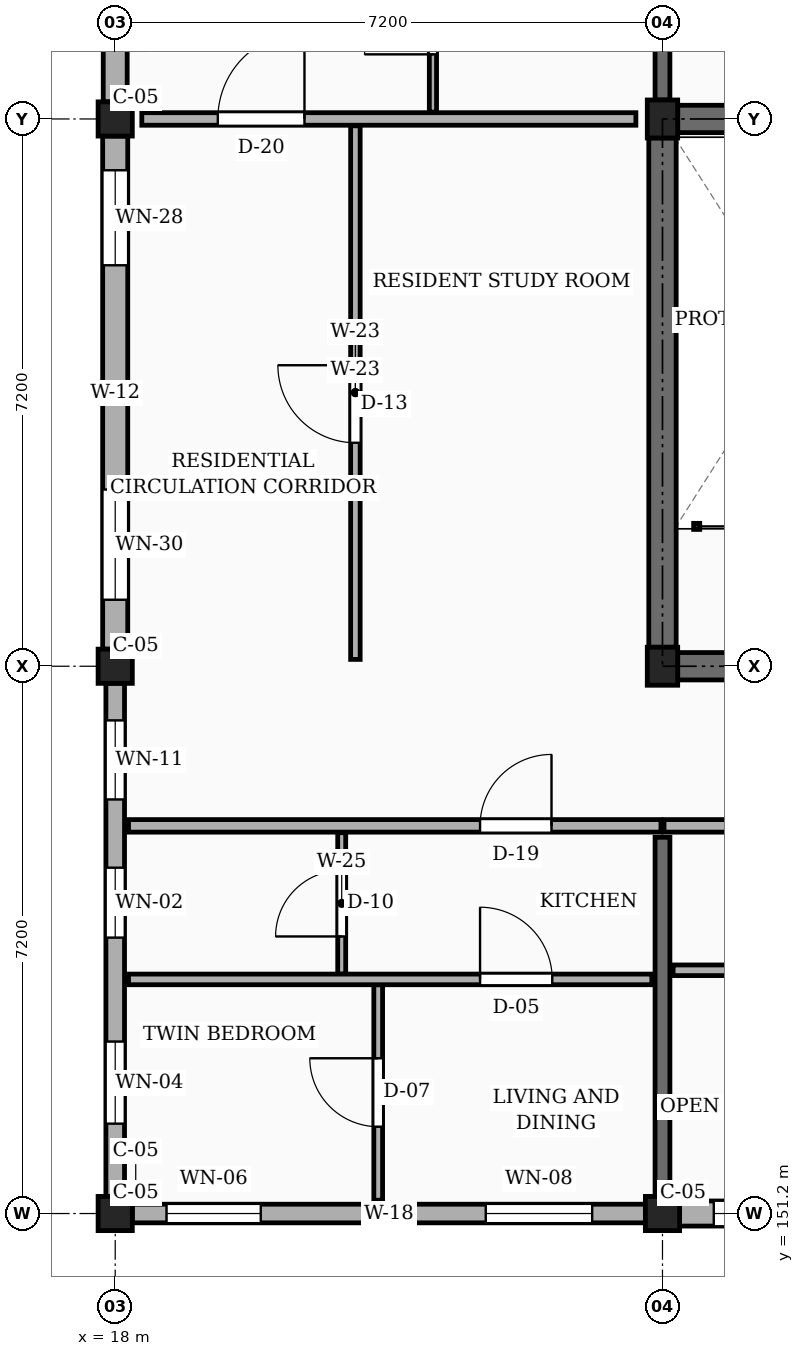
"""IFC4 building model, lengths in metres.
Left out: names, types, materials, properties, quantities, classifications, styles, units other than length and angle.
Written with IfcOpenShell. Run it as: python <this file> out.ifc"""

import sys

from ifc_helpers import new_model, si_unit, direction, frame, frame_2d, origin, origin_2d, place, context, subcontext, project, spatial, rectangle, extrude, element, fill, save


model = new_model("IFC4")
c1 = context("Model", 3, precision=1e-05, world=origin(), true_north=direction((0.0, 1.0)))
c2 = subcontext(c1, "Body", "Model", "MODEL_VIEW")
j1 = project(units=[si_unit("LENGTHUNIT", "METRE"), si_unit("PLANEANGLEUNIT", "RADIAN")], contexts=[c1])
p1 = place(None, origin())
s1 = spatial("IfcSite", under=j1, at=p1, CompositionType="ELEMENT")
p2 = place(p1, origin())
s2 = spatial("IfcBuilding", under=s1, at=p2, CompositionType="ELEMENT")
p3 = place(p2, frame((0.0, 0.0, 42.3)))
s3 = spatial("IfcBuildingStorey", under=s2, at=p3, CompositionType="ELEMENT", Elevation=42.3)
for number, where, z_axis, x_axis in (
    (1, (18.0, 151.2, 0.0), (0.0, 0.0, 1.0), (1.0, 0.0, 0.0)),
    (2, (18.0, 158.4, 0.0), (0.0, 0.0, 1.0), (1.0, 0.0, 0.0)),
    (3, (18.0, 165.6, 0.0), (0.0, 0.0, 1.0), (1.0, 0.0, 0.0)),
    (4, (25.2, 151.2, 0.0), (0.0, 0.0, 1.0), (1.0, 0.0, 0.0)),
):
    element("IfcColumn", number, at=place(p3, frame(where, z_axis=z_axis, x_axis=x_axis)), inside=s3, PredefinedType="COLUMN", context=c2, shape_type="SweptSolid", body=[
        extrude(rectangle(XDim=0.45, YDim=0.45, at=origin_2d()), origin(), (0.0, 0.0, 1.0), 3.15),
    ])
for number, where, z_axis, x_axis in (
    (5, (25.2, 158.4, 0.0), (0.0, 0.0, 1.0), (1.0, 0.0, 0.0)),
    (6, (25.2, 165.6, 0.0), (0.0, 0.0, 1.0), (1.0, 0.0, 0.0)),
):
    element("IfcColumn", number, at=place(p3, frame(where, z_axis=z_axis, x_axis=x_axis)), inside=s3, PredefinedType="COLUMN", context=c2, shape_type="SweptSolid", body=[
        extrude(rectangle(XDim=0.4, YDim=0.5, at=origin_2d()), origin(), (0.0, 0.0, 1.0), 3.15),
    ])
p4 = place(p3, frame((25.2, 151.425, 0.0), z_axis=(0.0, 0.0, 1.0), x_axis=(0.0, 1.0, 0.0)))
e7 = element("IfcWall", 7, at=p4, inside=s3, PredefinedType="SOLIDWALL", context=c2, shape_type="SweptSolid", body=[
    extrude(rectangle(XDim=4.725, YDim=0.195, at=frame_2d((2.362, 0.0))), origin(), (0.0, 0.0, 1.0), 2.22),
])
p5 = place(p3, frame((25.2, 165.85, 0.0), z_axis=(0.0, 0.0, 1.0), x_axis=(0.0, 1.0, 0.0)))
e8 = element("IfcWall", 8, at=p5, inside=s3, PredefinedType="SOLIDWALL", context=c2, shape_type="SweptSolid", body=[
    extrude(rectangle(XDim=6.725, YDim=0.195, at=frame_2d((3.362, 0.0))), origin(), (0.0, 0.0, 1.0), 2.22),
])
p6 = place(p5, frame((4.15, 0.0, 0.0)))
e9 = element("IfcOpeningElement", 9, at=p6, cuts=e8, PredefinedType="OPENING", context=c2, shape_type="SweptSolid", body=[
    extrude(rectangle(XDim=0.98, YDim=2.12, at=frame_2d((0.49, 1.06))), frame((0.0, 0.107, 0.0), z_axis=(0.0, -1.0, 0.0), x_axis=(1.0, 0.0, 0.0)), (0.0, 0.0, 1.0), 0.215),
])
p7 = place(p3, frame((18.225, 151.2, 0.0), z_axis=(0.0, 0.0, 1.0), x_axis=(1.0, 0.0, 0.0)))
e10 = element("IfcWall", 10, at=p7, inside=s3, PredefinedType="SOLIDWALL", context=c2, shape_type="SweptSolid", body=[
    extrude(rectangle(XDim=6.75, YDim=0.245, at=frame_2d((3.375, 0.0))), origin(), (0.0, 0.0, 1.0), 2.46),
])
p8 = place(p7, frame((0.45, 0.0, 0.78)))
e11 = element("IfcOpeningElement", 11, at=p8, cuts=e10, PredefinedType="OPENING", context=c2, shape_type="SweptSolid", body=[
    extrude(rectangle(XDim=1.24, YDim=1.15, at=frame_2d((0.62, 0.575))), frame((0.0, 0.133, 0.0), z_axis=(0.0, -1.0, 0.0), x_axis=(1.0, 0.0, 0.0)), (0.0, 0.0, 1.0), 0.265),
])
p9 = place(p7, frame((4.65, 0.0, 0.78)))
e12 = element("IfcOpeningElement", 12, at=p9, cuts=e10, PredefinedType="OPENING", context=c2, shape_type="SweptSolid", body=[
    extrude(rectangle(XDim=1.4, YDim=1.15, at=frame_2d((0.7, 0.575))), frame((0.0, 0.133, 0.0), z_axis=(0.0, -1.0, 0.0), x_axis=(1.0, 0.0, 0.0)), (0.0, 0.0, 1.0), 0.265),
])
p10 = place(p3, frame((25.425, 151.2, 0.0), z_axis=(0.0, 0.0, 1.0), x_axis=(1.0, 0.0, 0.0)))
e13 = element("IfcWall", 13, at=p10, inside=s3, PredefinedType="SOLIDWALL", context=c2, shape_type="SweptSolid", body=[
    extrude(rectangle(XDim=6.75, YDim=0.33, at=frame_2d((3.375, 0.0))), origin(), (0.0, 0.0, 1.0), 2.46),
])
p11 = place(p10, frame((0.45, 0.0, 0.78)))
e14 = element("IfcOpeningElement", 14, at=p11, cuts=e13, PredefinedType="OPENING", context=c2, shape_type="SweptSolid", body=[
    extrude(rectangle(XDim=1.4, YDim=1.15, at=frame_2d((0.7, 0.575))), frame((0.0, 0.175, 0.0), z_axis=(0.0, -1.0, 0.0), x_axis=(1.0, 0.0, 0.0)), (0.0, 0.0, 1.0), 0.35),
])
p12 = place(p10, frame((4.65, 0.0, 0.78)))
e15 = element("IfcOpeningElement", 15, at=p12, cuts=e13, PredefinedType="OPENING", context=c2, shape_type="SweptSolid", body=[
    extrude(rectangle(XDim=0.96, YDim=1.26, at=frame_2d((0.48, 0.63))), frame((0.0, 0.175, 0.0), z_axis=(0.0, -1.0, 0.0), x_axis=(1.0, 0.0, 0.0)), (0.0, 0.0, 1.0), 0.35),
])
p13 = place(p3, frame((18.0, 172.575, 0.0), z_axis=(0.0, 0.0, 1.0), x_axis=(0.0, -1.0, 0.0)))
e16 = element("IfcWall", 16, at=p13, inside=s3, PredefinedType="SOLIDWALL", context=c2, shape_type="SweptSolid", body=[
    extrude(rectangle(XDim=6.75, YDim=0.315, at=frame_2d((3.375, 0.0))), origin(), (0.0, 0.0, 1.0), 2.46),
])
p14 = place(p13, frame((0.45, 0.0, 0.78)))
e17 = element("IfcOpeningElement", 17, at=p14, cuts=e16, PredefinedType="OPENING", context=c2, shape_type="SweptSolid", body=[
    extrude(rectangle(XDim=1.05, YDim=1.44, at=frame_2d((0.525, 0.72))), frame((0.0, 0.167, 0.0), z_axis=(0.0, -1.0, 0.0), x_axis=(1.0, 0.0, 0.0)), (0.0, 0.0, 1.0), 0.335),
])
p15 = place(p13, frame((4.65, 0.0, 0.78)))
e18 = element("IfcOpeningElement", 18, at=p15, cuts=e16, PredefinedType="OPENING", context=c2, shape_type="SweptSolid", body=[
    extrude(rectangle(XDim=1.25, YDim=1.44, at=frame_2d((0.625, 0.72))), frame((0.0, 0.167, 0.0), z_axis=(0.0, -1.0, 0.0), x_axis=(1.0, 0.0, 0.0)), (0.0, 0.0, 1.0), 0.335),
])
p16 = place(p3, frame((18.0, 165.375, 0.0), z_axis=(0.0, 0.0, 1.0), x_axis=(0.0, -1.0, 0.0)))
e19 = element("IfcWall", 19, at=p16, inside=s3, PredefinedType="SOLIDWALL", context=c2, shape_type="SweptSolid", body=[
    extrude(rectangle(XDim=6.75, YDim=0.33, at=frame_2d((3.375, 0.0))), origin(), (0.0, 0.0, 1.0), 2.46),
])
p17 = place(p16, frame((0.45, 0.0, 0.78)))
e20 = element("IfcOpeningElement", 20, at=p17, cuts=e19, PredefinedType="OPENING", context=c2, shape_type="SweptSolid", body=[
    extrude(rectangle(XDim=1.25, YDim=1.44, at=frame_2d((0.625, 0.72))), frame((0.0, 0.175, 0.0), z_axis=(0.0, -1.0, 0.0), x_axis=(1.0, 0.0, 0.0)), (0.0, 0.0, 1.0), 0.35),
])
p18 = place(p16, frame((4.65, 0.0, 0.78)))
e21 = element("IfcOpeningElement", 21, at=p18, cuts=e19, PredefinedType="OPENING", context=c2, shape_type="SweptSolid", body=[
    extrude(rectangle(XDim=1.45, YDim=1.44, at=frame_2d((0.725, 0.72))), frame((0.0, 0.175, 0.0), z_axis=(0.0, -1.0, 0.0), x_axis=(1.0, 0.0, 0.0)), (0.0, 0.0, 1.0), 0.35),
])
p19 = place(p3, frame((18.0, 158.175, 0.0), z_axis=(0.0, 0.0, 1.0), x_axis=(0.0, -1.0, 0.0)))
e22 = element("IfcWall", 22, at=p19, inside=s3, PredefinedType="SOLIDWALL", context=c2, shape_type="SweptSolid", body=[
    extrude(rectangle(XDim=6.75, YDim=0.245, at=frame_2d((3.375, 0.0))), origin(), (0.0, 0.0, 1.0), 2.46),
])
p20 = place(p19, frame((0.488, 0.0, 0.78)))
e23 = element("IfcOpeningElement", 23, at=p20, cuts=e22, PredefinedType="OPENING", context=c2, shape_type="SweptSolid", body=[
    extrude(rectangle(XDim=1.04, YDim=1.26, at=frame_2d((0.52, 0.63))), frame((0.0, 0.133, 0.0), z_axis=(0.0, -1.0, 0.0), x_axis=(1.0, 0.0, 0.0)), (0.0, 0.0, 1.0), 0.265),
])
p21 = place(p19, frame((2.425, 0.0, 0.78)))
e24 = element("IfcOpeningElement", 24, at=p21, cuts=e22, PredefinedType="OPENING", context=c2, shape_type="SweptSolid", body=[
    extrude(rectangle(XDim=0.92, YDim=1.15, at=frame_2d((0.46, 0.575))), frame((0.0, 0.133, 0.0), z_axis=(0.0, -1.0, 0.0), x_axis=(1.0, 0.0, 0.0)), (0.0, 0.0, 1.0), 0.265),
])
p22 = place(p19, frame((4.712, 0.0, 0.78)))
e25 = element("IfcOpeningElement", 25, at=p22, cuts=e22, PredefinedType="OPENING", context=c2, shape_type="SweptSolid", body=[
    extrude(rectangle(XDim=1.08, YDim=1.15, at=frame_2d((0.54, 0.575))), frame((0.0, 0.133, 0.0), z_axis=(0.0, -1.0, 0.0), x_axis=(1.0, 0.0, 0.0)), (0.0, 0.0, 1.0), 0.265),
])
p23 = place(p3, frame((25.2, 158.65, 0.0), z_axis=(0.0, 0.0, 1.0), x_axis=(0.0, 1.0, 0.0)))
e26 = element("IfcWall", 26, at=p23, inside=s3, PredefinedType="SHEAR", context=c2, shape_type="SweptSolid", body=[
    extrude(rectangle(XDim=6.7, YDim=0.36, at=frame_2d((3.35, 0.0))), origin(), (0.0, 0.0, 1.0), 2.89),
])
p24 = place(p3, frame((25.4, 165.6, 0.0), z_axis=(0.0, 0.0, 1.0), x_axis=(1.0, 0.0, 0.0)))
e27 = element("IfcWall", 27, at=p24, inside=s3, PredefinedType="SHEAR", context=c2, shape_type="SweptSolid", body=[
    extrude(rectangle(XDim=6.8, YDim=0.36, at=frame_2d((3.4, 0.0))), origin(), (0.0, 0.0, 1.0), 2.89),
])
p25 = place(p3, frame((25.4, 158.4, 0.0), z_axis=(0.0, 0.0, 1.0), x_axis=(1.0, 0.0, 0.0)))
e28 = element("IfcWall", 28, at=p25, inside=s3, PredefinedType="SHEAR", context=c2, shape_type="SweptSolid", body=[
    extrude(rectangle(XDim=6.8, YDim=0.36, at=frame_2d((3.4, 0.0))), origin(), (0.0, 0.0, 1.0), 2.89),
])
p26 = place(p25, frame((4.55, 0.0, 0.0)))
e29 = element("IfcOpeningElement", 29, at=p26, cuts=e28, PredefinedType="OPENING", context=c2, shape_type="SweptSolid", body=[
    extrude(rectangle(XDim=1.1, YDim=2.15, at=frame_2d((0.55, 1.075))), frame((0.0, 0.19, 0.0), z_axis=(0.0, -1.0, 0.0), x_axis=(1.0, 0.0, 0.0)), (0.0, 0.0, 1.0), 0.38),
])
p27 = place(p3, frame((18.175, 156.3, 0.0), z_axis=(0.0, 0.0, 1.0), x_axis=(1.0, 0.0, 0.0)))
e30 = element("IfcWall", 30, at=p27, inside=s3, PredefinedType="PARTITIONING", context=c2, shape_type="SweptSolid", body=[
    extrude(rectangle(XDim=7.005, YDim=0.165, at=frame_2d((3.502, 0.0))), origin(), (0.0, 0.0, 1.0), 2.325),
])
p28 = place(p27, frame((4.625, 0.0, 0.0)))
e31 = element("IfcOpeningElement", 31, at=p28, cuts=e30, PredefinedType="OPENING", context=c2, shape_type="SweptSolid", body=[
    extrude(rectangle(XDim=0.94, YDim=2.12, at=frame_2d((0.47, 1.06))), frame((0.0, 0.093, 0.0), z_axis=(0.0, -1.0, 0.0), x_axis=(1.0, 0.0, 0.0)), (0.0, 0.0, 1.0), 0.185),
])
p29 = place(p3, frame((25.22, 156.3, 0.0), z_axis=(0.0, 0.0, 1.0), x_axis=(1.0, 0.0, 0.0)))
e32 = element("IfcWall", 32, at=p29, inside=s3, PredefinedType="PARTITIONING", context=c2, shape_type="SweptSolid", body=[
    extrude(rectangle(XDim=7.16, YDim=0.165, at=frame_2d((3.58, 0.0))), origin(), (0.0, 0.0, 1.0), 2.325),
])
p30 = place(p29, frame((1.33, 0.0, 0.0)))
e33 = element("IfcOpeningElement", 33, at=p30, cuts=e32, PredefinedType="OPENING", context=c2, shape_type="SweptSolid", body=[
    extrude(rectangle(XDim=1.14, YDim=2.18, at=frame_2d((0.57, 1.09))), frame((0.0, 0.093, 0.0), z_axis=(0.0, -1.0, 0.0), x_axis=(1.0, 0.0, 0.0)), (0.0, 0.0, 1.0), 0.185),
])
p31 = place(p3, frame((18.35, 165.6, 0.0), z_axis=(0.0, 0.0, 1.0), x_axis=(1.0, 0.0, 0.0)))
e34 = element("IfcWall", 34, at=p31, inside=s3, PredefinedType="PARTITIONING", context=c2, shape_type="SweptSolid", body=[
    extrude(rectangle(XDim=6.5, YDim=0.165, at=frame_2d((3.25, 0.0))), origin(), (0.0, 0.0, 1.0), 2.325),
])
p32 = place(p31, frame((1.0, 0.0, 0.0)))
e35 = element("IfcOpeningElement", 35, at=p32, cuts=e34, PredefinedType="OPENING", context=c2, shape_type="SweptSolid", body=[
    extrude(rectangle(XDim=1.14, YDim=2.18, at=frame_2d((0.57, 1.09))), frame((0.0, 0.093, 0.0), z_axis=(0.0, -1.0, 0.0), x_axis=(1.0, 0.0, 0.0)), (0.0, 0.0, 1.0), 0.185),
])
p33 = place(p3, frame((21.16, 158.49, 0.0), z_axis=(0.0, 0.0, 1.0), x_axis=(0.0, 1.0, 0.0)))
e36 = element("IfcWall", 36, at=p33, inside=s3, PredefinedType="PARTITIONING", context=c2, shape_type="SweptSolid", body=[
    extrude(rectangle(XDim=7.02, YDim=0.125, at=frame_2d((3.51, 0.0))), origin(), (0.0, 0.0, 1.0), 2.325),
])
p34 = place(p33, frame((2.85, 0.0, 0.0)))
e37 = element("IfcOpeningElement", 37, at=p34, cuts=e36, PredefinedType="OPENING", context=c2, shape_type="SweptSolid", body=[
    extrude(rectangle(XDim=1.02, YDim=2.15, at=frame_2d((0.51, 1.075))), frame((0.0, 0.073, 0.0), z_axis=(0.0, -1.0, 0.0), x_axis=(1.0, 0.0, 0.0)), (0.0, 0.0, 1.0), 0.145),
])
p35 = place(p3, frame((21.46, 151.375, 0.0), z_axis=(0.0, 0.0, 1.0), x_axis=(0.0, 1.0, 0.0)))
e38 = element("IfcWall", 38, at=p35, inside=s3, PredefinedType="PARTITIONING", context=c2, shape_type="SweptSolid", body=[
    extrude(rectangle(XDim=2.835, YDim=0.115, at=frame_2d((1.417, 0.0))), origin(), (0.0, 0.0, 1.0), 2.325),
])
p36 = place(p35, frame((0.968, 0.0, 0.0)))
e39 = element("IfcOpeningElement", 39, at=p36, cuts=e38, PredefinedType="OPENING", context=c2, shape_type="SweptSolid", body=[
    extrude(rectangle(XDim=0.9, YDim=2.1, at=frame_2d((0.45, 1.05))), frame((0.0, 0.067, 0.0), z_axis=(0.0, -1.0, 0.0), x_axis=(1.0, 0.0, 0.0)), (0.0, 0.0, 1.0), 0.135),
])
p37 = place(p3, frame((20.98, 154.35, 0.0), z_axis=(0.0, 0.0, 1.0), x_axis=(0.0, 1.0, 0.0)))
e40 = element("IfcWall", 40, at=p37, inside=s3, PredefinedType="PARTITIONING", context=c2, shape_type="SweptSolid", body=[
    extrude(rectangle(XDim=1.86, YDim=0.105, at=frame_2d((0.93, 0.0))), origin(), (0.0, 0.0, 1.0), 2.325),
])
p38 = place(p37, frame((0.495, 0.0, 0.0)))
e41 = element("IfcOpeningElement", 41, at=p38, cuts=e40, PredefinedType="OPENING", context=c2, shape_type="SweptSolid", body=[
    extrude(rectangle(XDim=0.87, YDim=2.05, at=frame_2d((0.435, 1.025))), frame((0.0, 0.062, 0.0), z_axis=(0.0, -1.0, 0.0), x_axis=(1.0, 0.0, 0.0)), (0.0, 0.0, 1.0), 0.125),
])
p39 = place(p3, frame((18.175, 154.28, 0.0), z_axis=(0.0, 0.0, 1.0), x_axis=(1.0, 0.0, 0.0)))
e42 = element("IfcWall", 42, at=p39, inside=s3, PredefinedType="PARTITIONING", context=c2, shape_type="SweptSolid", body=[
    extrude(rectangle(XDim=6.885, YDim=0.14, at=frame_2d((3.442, 0.0))), origin(), (0.0, 0.0, 1.0), 2.325),
])
p40 = place(p39, frame((4.625, 0.0, 0.0)))
e43 = element("IfcOpeningElement", 43, at=p40, cuts=e42, PredefinedType="OPENING", context=c2, shape_type="SweptSolid", body=[
    extrude(rectangle(XDim=0.95, YDim=2.1, at=frame_2d((0.475, 1.05))), frame((0.0, 0.08, 0.0), z_axis=(0.0, -1.0, 0.0), x_axis=(1.0, 0.0, 0.0)), (0.0, 0.0, 1.0), 0.16),
])
p41 = place(p3, frame((22.18, 165.69, 0.0), z_axis=(0.0, 0.0, 1.0), x_axis=(0.0, 1.0, 0.0)))
e44 = element("IfcWall", 44, at=p41, inside=s3, PredefinedType="PARTITIONING", context=c2, shape_type="SweptSolid", body=[
    extrude(rectangle(XDim=2.42, YDim=0.095, at=frame_2d((1.21, 0.0))), origin(), (0.0, 0.0, 1.0), 2.325),
])
p42 = place(p41, frame((0.76, 0.0, 0.0)))
e45 = element("IfcOpeningElement", 45, at=p42, cuts=e44, PredefinedType="OPENING", context=c2, shape_type="SweptSolid", body=[
    extrude(rectangle(XDim=0.9, YDim=2.05, at=frame_2d((0.45, 1.025))), frame((0.0, 0.058, 0.0), z_axis=(0.0, -1.0, 0.0), x_axis=(1.0, 0.0, 0.0)), (0.0, 0.0, 1.0), 0.115),
])
p43 = place(p3, frame((25.34, 154.4, 0.0), z_axis=(0.0, 0.0, 1.0), x_axis=(1.0, 0.0, 0.0)))
e46 = element("IfcWall", 46, at=p43, inside=s3, PredefinedType="PARTITIONING", context=c2, shape_type="SweptSolid", body=[
    extrude(rectangle(XDim=6.92, YDim=0.14, at=frame_2d((3.46, 0.0))), origin(), (0.0, 0.0, 1.0), 2.325),
])
p44 = place(p43, frame((1.31, 0.0, 0.0)))
e47 = element("IfcOpeningElement", 47, at=p44, cuts=e46, PredefinedType="OPENING", context=c2, shape_type="SweptSolid", body=[
    extrude(rectangle(XDim=0.92, YDim=2.1, at=frame_2d((0.46, 1.05))), frame((0.0, 0.08, 0.0), z_axis=(0.0, -1.0, 0.0), x_axis=(1.0, 0.0, 0.0)), (0.0, 0.0, 1.0), 0.16),
])
p45 = place(p8, origin())
e48 = element("IfcWindow", 48, at=p45, inside=s3, PartitioningType="SINGLE_PANEL", PredefinedType="WINDOW", context=c2, shape_type="SweptSolid", body=[
    extrude(rectangle(XDim=1.24, YDim=1.15, at=frame_2d((0.62, 0.575))), frame((0.0, 0.03, 0.0), z_axis=(0.0, -1.0, 0.0), x_axis=(1.0, 0.0, 0.0)), (0.0, 0.0, 1.0), 0.06),
])
fill(e11, e48)
p46 = place(p9, origin())
e49 = element("IfcWindow", 49, at=p46, inside=s3, PartitioningType="SINGLE_PANEL", PredefinedType="WINDOW", context=c2, shape_type="SweptSolid", body=[
    extrude(rectangle(XDim=1.4, YDim=1.15, at=frame_2d((0.7, 0.575))), frame((0.0, 0.03, 0.0), z_axis=(0.0, -1.0, 0.0), x_axis=(1.0, 0.0, 0.0)), (0.0, 0.0, 1.0), 0.06),
])
fill(e12, e49)
p47 = place(p11, origin())
e50 = element("IfcWindow", 50, at=p47, inside=s3, PartitioningType="SINGLE_PANEL", PredefinedType="WINDOW", context=c2, shape_type="SweptSolid", body=[
    extrude(rectangle(XDim=1.4, YDim=1.15, at=frame_2d((0.7, 0.575))), frame((0.0, 0.03, 0.0), z_axis=(0.0, -1.0, 0.0), x_axis=(1.0, 0.0, 0.0)), (0.0, 0.0, 1.0), 0.06),
])
fill(e14, e50)
p48 = place(p17, origin())
e51 = element("IfcWindow", 51, at=p48, inside=s3, PartitioningType="SINGLE_PANEL", PredefinedType="WINDOW", context=c2, shape_type="SweptSolid", body=[
    extrude(rectangle(XDim=1.25, YDim=1.44, at=frame_2d((0.625, 0.72))), frame((0.0, 0.03, 0.0), z_axis=(0.0, -1.0, 0.0), x_axis=(1.0, 0.0, 0.0)), (0.0, 0.0, 1.0), 0.06),
])
fill(e20, e51)
p49 = place(p18, origin())
e52 = element("IfcWindow", 52, at=p49, inside=s3, PartitioningType="SINGLE_PANEL", PredefinedType="WINDOW", context=c2, shape_type="SweptSolid", body=[
    extrude(rectangle(XDim=1.45, YDim=1.44, at=frame_2d((0.725, 0.72))), frame((0.0, 0.03, 0.0), z_axis=(0.0, -1.0, 0.0), x_axis=(1.0, 0.0, 0.0)), (0.0, 0.0, 1.0), 0.06),
])
fill(e21, e52)
p50 = place(p20, origin())
e53 = element("IfcWindow", 53, at=p50, inside=s3, PartitioningType="SINGLE_PANEL", PredefinedType="WINDOW", context=c2, shape_type="SweptSolid", body=[
    extrude(rectangle(XDim=1.04, YDim=1.26, at=frame_2d((0.52, 0.63))), frame((0.0, 0.03, 0.0), z_axis=(0.0, -1.0, 0.0), x_axis=(1.0, 0.0, 0.0)), (0.0, 0.0, 1.0), 0.06),
])
fill(e23, e53)
p51 = place(p21, origin())
e54 = element("IfcWindow", 54, at=p51, inside=s3, PartitioningType="SINGLE_PANEL", PredefinedType="WINDOW", context=c2, shape_type="SweptSolid", body=[
    extrude(rectangle(XDim=0.92, YDim=1.15, at=frame_2d((0.46, 0.575))), frame((0.0, 0.03, 0.0), z_axis=(0.0, -1.0, 0.0), x_axis=(1.0, 0.0, 0.0)), (0.0, 0.0, 1.0), 0.06),
])
fill(e24, e54)
p52 = place(p22, origin())
e55 = element("IfcWindow", 55, at=p52, inside=s3, PartitioningType="SINGLE_PANEL", PredefinedType="WINDOW", context=c2, shape_type="SweptSolid", body=[
    extrude(rectangle(XDim=1.08, YDim=1.15, at=frame_2d((0.54, 0.575))), frame((0.0, 0.03, 0.0), z_axis=(0.0, -1.0, 0.0), x_axis=(1.0, 0.0, 0.0)), (0.0, 0.0, 1.0), 0.06),
])
fill(e25, e55)
p53 = place(p28, origin())
e56 = element("IfcDoor", 56, at=p53, inside=s3, OperationType="SINGLE_SWING_RIGHT", PredefinedType="DOOR", context=c2, shape_type="SweptSolid", body=[
    extrude(rectangle(XDim=0.94, YDim=2.12, at=frame_2d((0.47, 1.06))), frame((0.0, 0.025, 0.0), z_axis=(0.0, -1.0, 0.0), x_axis=(1.0, 0.0, 0.0)), (0.0, 0.0, 1.0), 0.05),
])
fill(e31, e56)
p54 = place(p32, origin())
e57 = element("IfcDoor", 57, at=p54, inside=s3, OperationType="SINGLE_SWING_RIGHT", PredefinedType="DOOR", context=c2, shape_type="SweptSolid", body=[
    extrude(rectangle(XDim=1.14, YDim=2.18, at=frame_2d((0.57, 1.09))), frame((0.0, 0.025, 0.0), z_axis=(0.0, -1.0, 0.0), x_axis=(1.0, 0.0, 0.0)), (0.0, 0.0, 1.0), 0.05),
])
fill(e35, e57)
p55 = place(p34, origin())
e58 = element("IfcDoor", 58, at=p55, inside=s3, OperationType="SINGLE_SWING_RIGHT", PredefinedType="DOOR", context=c2, shape_type="SweptSolid", body=[
    extrude(rectangle(XDim=1.02, YDim=2.15, at=frame_2d((0.51, 1.075))), frame((0.0, 0.025, 0.0), z_axis=(0.0, -1.0, 0.0), x_axis=(1.0, 0.0, 0.0)), (0.0, 0.0, 1.0), 0.05),
])
fill(e37, e58)
p56 = place(p36, origin())
e59 = element("IfcDoor", 59, at=p56, inside=s3, OperationType="SINGLE_SWING_RIGHT", PredefinedType="DOOR", context=c2, shape_type="SweptSolid", body=[
    extrude(rectangle(XDim=0.9, YDim=2.1, at=frame_2d((0.45, 1.05))), frame((0.0, 0.025, 0.0), z_axis=(0.0, -1.0, 0.0), x_axis=(1.0, 0.0, 0.0)), (0.0, 0.0, 1.0), 0.05),
])
fill(e39, e59)
p57 = place(p38, origin())
e60 = element("IfcDoor", 60, at=p57, inside=s3, OperationType="SINGLE_SWING_LEFT", PredefinedType="DOOR", context=c2, shape_type="SweptSolid", body=[
    extrude(rectangle(XDim=0.87, YDim=2.05, at=frame_2d((0.435, 1.025))), frame((0.0, 0.025, 0.0), z_axis=(0.0, -1.0, 0.0), x_axis=(1.0, 0.0, 0.0)), (0.0, 0.0, 1.0), 0.05),
])
fill(e41, e60)
p58 = place(p40, origin())
e61 = element("IfcDoor", 61, at=p58, inside=s3, OperationType="SINGLE_SWING_LEFT", PredefinedType="DOOR", context=c2, shape_type="SweptSolid", body=[
    extrude(rectangle(XDim=0.95, YDim=2.1, at=frame_2d((0.475, 1.05))), frame((0.0, 0.025, 0.0), z_axis=(0.0, -1.0, 0.0), x_axis=(1.0, 0.0, 0.0)), (0.0, 0.0, 1.0), 0.05),
])
fill(e43, e61)
p59 = place(p42, origin())
e62 = element("IfcDoor", 62, at=p59, inside=s3, OperationType="SINGLE_SWING_LEFT", PredefinedType="DOOR", context=c2, shape_type="SweptSolid", body=[
    extrude(rectangle(XDim=0.9, YDim=2.05, at=frame_2d((0.45, 1.025))), frame((0.0, 0.025, 0.0), z_axis=(0.0, -1.0, 0.0), x_axis=(1.0, 0.0, 0.0)), (0.0, 0.0, 1.0), 0.05),
])
fill(e45, e62)
save(model, sys.argv[1])
